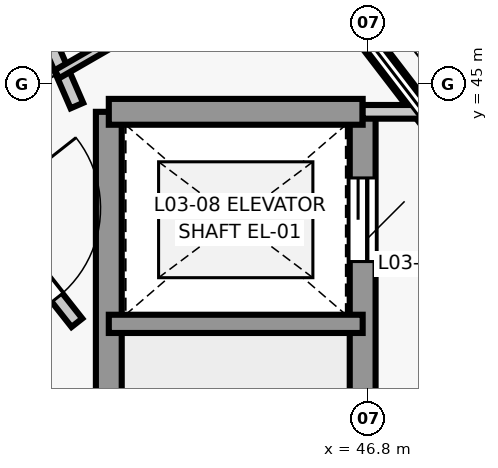
"""IFC4 building model, lengths in metres.
Left out: names, types, materials, properties, quantities, classifications, styles, units other than length and angle.
Written with IfcOpenShell. Run it as: python <this file> out.ifc"""

import sys

from ifc_helpers import new_model, si_unit, direction, frame, frame_2d, origin, place, context, subcontext, project, spatial, rectangle, extrude, element, fill, save


model = new_model("IFC4")
c1 = context("Model", 3, precision=1e-05, world=origin(), true_north=direction((0.0, 1.0)))
c2 = subcontext(c1, "Body", "Model", "MODEL_VIEW")
j1 = project(units=[si_unit("LENGTHUNIT", "METRE"), si_unit("PLANEANGLEUNIT", "RADIAN")], contexts=[c1])
p1 = place(None, origin())
s1 = spatial("IfcSite", under=j1, at=p1, CompositionType="ELEMENT")
p2 = place(p1, origin())
s2 = spatial("IfcBuilding", under=s1, at=p2, CompositionType="ELEMENT")
p3 = place(p2, frame((0.0, 0.0, 12.6)))
s3 = spatial("IfcBuildingStorey", under=s2, at=p3, CompositionType="ELEMENT", Elevation=12.6)
p4 = place(p3, frame((45.042, 33.371, 0.0), z_axis=(0.0, 0.0, 1.0), x_axis=(-0.608753590889, 0.79335935463, 0.0)))
e1 = element("IfcWall", 1, at=p4, inside=s3, PredefinedType="STANDARD", context=c2, shape_type="SweptSolid", body=[
    extrude(rectangle(XDim=10.852, YDim=0.28, at=frame_2d((5.426, 0.0))), origin(), (0.0, 0.0, 1.0), 0.82),
])
p5 = place(p3, frame((45.999, 46.62, 0.0), z_axis=(0.0, 0.0, 1.0), x_axis=(0.608769580289, -0.793347085527, 0.0)))
e2 = element("IfcWall", 2, at=p5, inside=s3, PredefinedType="STANDARD", context=c2, shape_type="SweptSolid", body=[
    extrude(rectangle(XDim=9.005, YDim=0.25, at=frame_2d((4.502, 0.0))), origin(), (0.0, 0.0, 1.0), 0.82),
])
p6 = place(p3, frame((46.731, 44.63, 0.0), z_axis=(0.0, 0.0, 1.0), x_axis=(0.0, -1.0, 0.0)))
e3 = element("IfcWall", 3, at=p6, inside=s3, PredefinedType="SHEAR", context=c2, shape_type="SweptSolid", body=[
    extrude(rectangle(XDim=9.73, YDim=0.34, at=frame_2d((4.865, 0.0))), origin(), (0.0, 0.0, 1.0), 3.9),
])
p7 = place(p6, frame((8.265, 0.0, 0.0)))
e4 = element("IfcOpeningElement", 4, at=p7, cuts=e3, PredefinedType="OPENING", context=c2, shape_type="SweptSolid", body=[
    extrude(rectangle(XDim=1.15, YDim=2.15, at=frame_2d((0.575, 1.075))), frame((0.0, 0.18, 0.0), z_axis=(0.0, -1.0, 0.0), x_axis=(1.0, 0.0, 0.0)), (0.0, 0.0, 1.0), 0.36),
])
p8 = place(p6, frame((0.87, 0.0, 0.0)))
e5 = element("IfcOpeningElement", 5, at=p8, cuts=e3, PredefinedType="OPENING", context=c2, shape_type="SweptSolid", body=[
    extrude(rectangle(XDim=1.1, YDim=2.15, at=frame_2d((0.55, 1.075))), frame((0.0, 0.18, 0.0), z_axis=(0.0, -1.0, 0.0), x_axis=(1.0, 0.0, 0.0)), (0.0, 0.0, 1.0), 0.36),
])
p9 = place(p3, frame((43.391, 34.9, 0.0), z_axis=(0.0, 0.0, 1.0), x_axis=(0.0, 1.0, 0.0)))
e6 = element("IfcWall", 6, at=p9, inside=s3, PredefinedType="SHEAR", context=c2, shape_type="SweptSolid", body=[
    extrude(rectangle(XDim=9.73, YDim=0.34, at=frame_2d((4.865, 0.0))), origin(), (0.0, 0.0, 1.0), 3.9),
])
p10 = place(p3, frame((43.391, 44.63, 0.0), z_axis=(0.0, 0.0, 1.0), x_axis=(1.0, 0.0, 0.0)))
e7 = element("IfcWall", 7, at=p10, inside=s3, PredefinedType="SHEAR", context=c2, shape_type="SweptSolid", body=[
    extrude(rectangle(XDim=3.34, YDim=0.34, at=frame_2d((1.67, 0.0))), origin(), (0.0, 0.0, 1.0), 3.9),
])
p11 = place(p3, frame((46.731, 41.84, 0.0), z_axis=(0.0, 0.0, 1.0), x_axis=(-1.0, 0.0, 0.0)))
e8 = element("IfcWall", 8, at=p11, inside=s3, PredefinedType="SHEAR", context=c2, shape_type="SweptSolid", body=[
    extrude(rectangle(XDim=3.34, YDim=0.24, at=frame_2d((1.67, 0.0))), origin(), (0.0, 0.0, 1.0), 3.9),
])
p12 = place(p3, frame((46.731, 44.63, 0.0), z_axis=(0.0, 0.0, 1.0), x_axis=(1.0, 0.0, 0.0)))
e9 = element("IfcWall", 9, at=p12, inside=s3, PredefinedType="PARTITIONING", context=c2, shape_type="SweptSolid", body=[
    extrude(rectangle(XDim=2.25, YDim=0.18, at=frame_2d((1.125, 0.0))), origin(), (0.0, 0.0, 1.0), 3.595),
])
p13 = place(p3, frame((38.845, 54.211, 0.0), z_axis=(0.0, 0.0, 1.0), x_axis=(0.398415754491, -0.917204931612, 0.0)))
e10 = element("IfcWall", 10, at=p13, inside=s3, PredefinedType="PARTITIONING", context=c2, shape_type="SweptSolid", body=[
    extrude(rectangle(XDim=10.356, YDim=0.18, at=frame_2d((5.178, 0.0))), origin(), (0.0, 0.0, 1.0), 3.595),
])
p14 = place(p13, frame((4.578, 0.0, 0.0)))
e11 = element("IfcOpeningElement", 11, at=p14, cuts=e10, PredefinedType="OPENING", context=c2, shape_type="SweptSolid", body=[
    extrude(rectangle(XDim=1.2, YDim=2.15, at=frame_2d((0.6, 1.075))), frame((0.0, 0.1, 0.0), z_axis=(0.0, -1.0, 0.0), x_axis=(1.0, 0.0, 0.0)), (0.0, 0.0, 1.0), 0.2),
])
p15 = place(p3, frame((41.523, 43.69, 0.0), z_axis=(0.0, 0.0, 1.0), x_axis=(0.619332805276, -0.785128573107, 0.0)))
e12 = element("IfcWall", 12, at=p15, inside=s3, PredefinedType="PARTITIONING", context=c2, shape_type="SweptSolid", body=[
    extrude(rectangle(XDim=2.338, YDim=0.18, at=frame_2d((1.169, 0.0))), origin(), (0.0, 0.0, 1.0), 3.595),
])
p16 = place(p15, frame((0.419, 0.0, 0.0)))
e13 = element("IfcOpeningElement", 13, at=p16, cuts=e12, PredefinedType="OPENING", context=c2, shape_type="SweptSolid", body=[
    extrude(rectangle(XDim=1.5, YDim=2.15, at=frame_2d((0.75, 1.075))), frame((0.0, 0.1, 0.0), z_axis=(0.0, -1.0, 0.0), x_axis=(1.0, 0.0, 0.0)), (0.0, 0.0, 1.0), 0.2),
])
p17 = place(p3, frame((45.308, 46.625, 0.0), z_axis=(0.0, 0.0, 1.0), x_axis=(-0.866031096941, -0.499990139034, 0.0)))
e14 = element("IfcWall", 14, at=p17, inside=s3, PredefinedType="PARTITIONING", context=c2, shape_type="SweptSolid", body=[
    extrude(rectangle(XDim=3.0, YDim=0.12, at=frame_2d((1.5, 0.0))), origin(), (0.0, 0.0, 1.0), 2.957),
])
p18 = place(p8, origin())
e15 = element("IfcDoor", 15, at=p18, inside=s3, OperationType="SLIDING_TO_LEFT", PredefinedType="DOOR", context=c2, shape_type="SweptSolid", body=[
    extrude(rectangle(XDim=1.1, YDim=2.15, at=frame_2d((0.55, 1.075))), frame((0.0, 0.025, 0.0), z_axis=(0.0, -1.0, 0.0), x_axis=(1.0, 0.0, 0.0)), (0.0, 0.0, 1.0), 0.05),
])
fill(e5, e15)
p19 = place(p16, origin())
e16 = element("IfcDoor", 16, at=p19, inside=s3, OperationType="SINGLE_SWING_LEFT", PredefinedType="DOOR", context=c2, shape_type="SweptSolid", body=[
    extrude(rectangle(XDim=1.5, YDim=2.15, at=frame_2d((0.75, 1.075))), frame((0.0, 0.025, 0.0), z_axis=(0.0, -1.0, 0.0), x_axis=(1.0, 0.0, 0.0)), (0.0, 0.0, 1.0), 0.05),
])
fill(e13, e16)
save(model, sys.argv[1])
